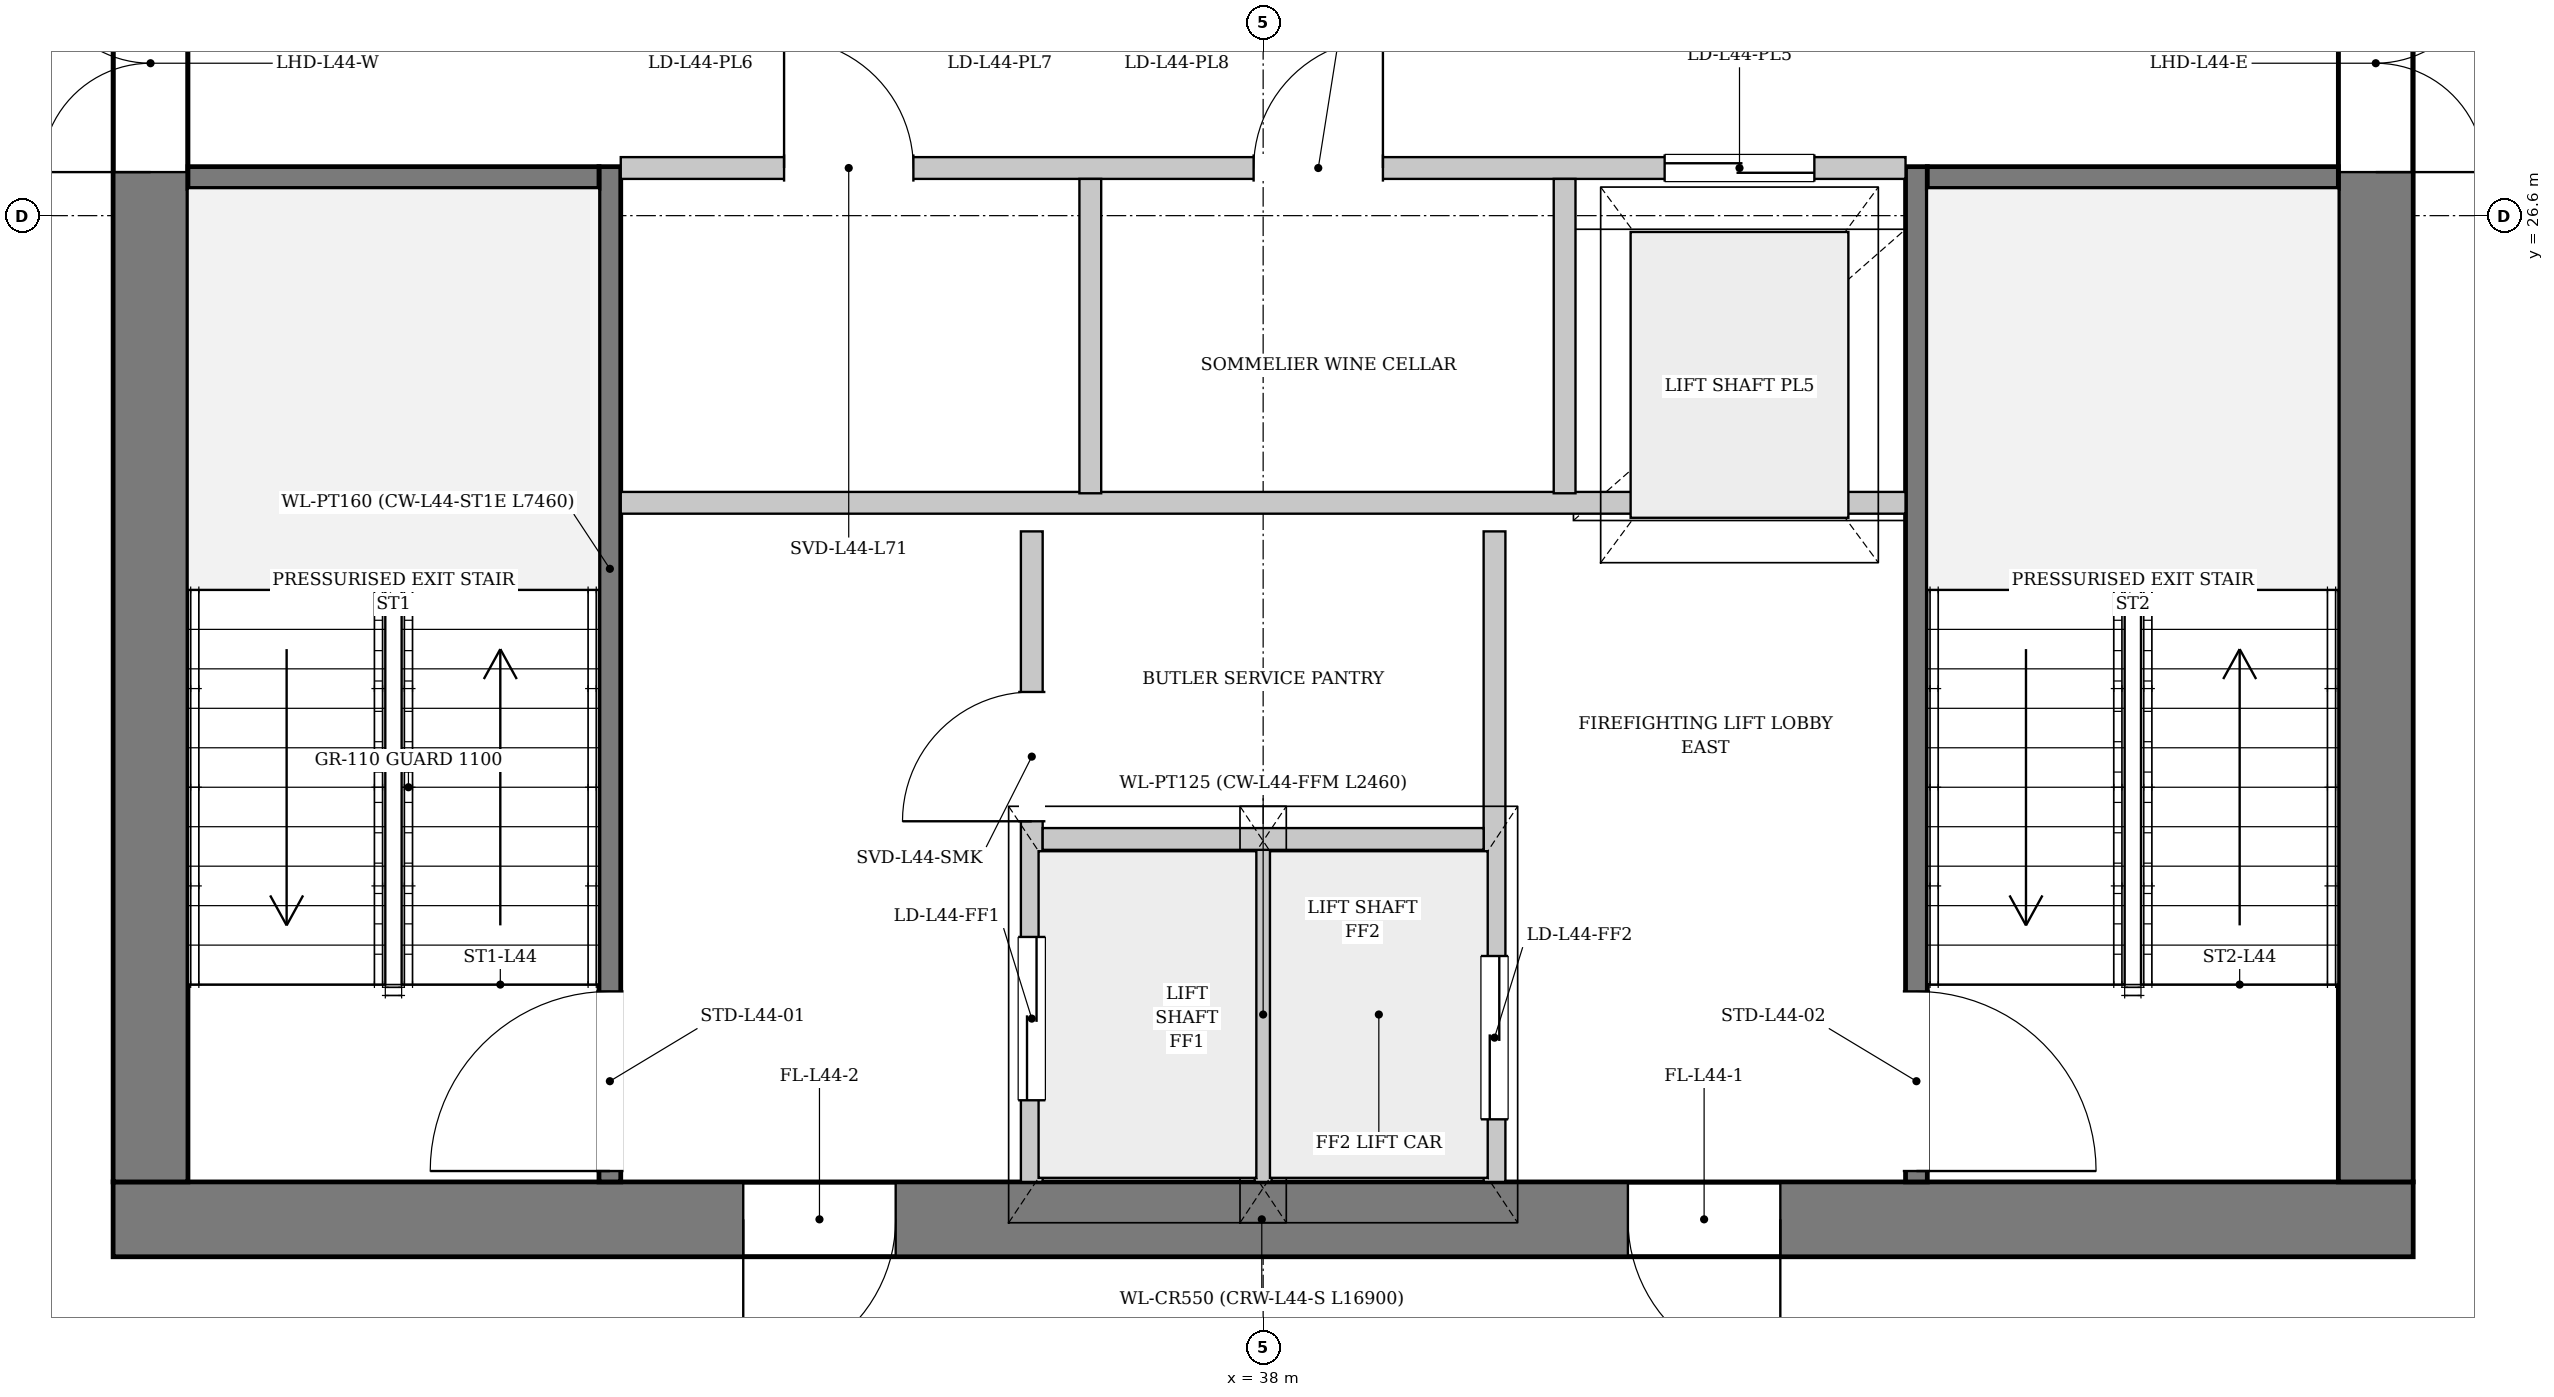
"""IFC4 building model, lengths in metres.
Left out: names, types, materials, properties, quantities, classifications, styles, units other than length and angle.
Written with IfcOpenShell. Run it as: python <this file> out.ifc"""

import sys

from ifc_helpers import new_model, si_unit, direction, frame, frame_2d, origin, place, context, subcontext, project, spatial, rectangle, extrude, source, transform, mapped, element, fill, save


model = new_model("IFC4")
c1 = context("Model", 3, precision=1e-05, world=origin(), true_north=direction((0.0, 1.0)))
c2 = subcontext(c1, "Body", "Model", "MODEL_VIEW")
j1 = project(units=[si_unit("LENGTHUNIT", "METRE"), si_unit("PLANEANGLEUNIT", "RADIAN")], contexts=[c1])
p1 = place(None, origin())
s1 = spatial("IfcSite", under=j1, at=p1, CompositionType="ELEMENT")
p2 = place(p1, origin())
s2 = spatial("IfcBuilding", under=s1, at=p2, CompositionType="ELEMENT")
p3 = place(p2, frame((0.0, 0.0, 167.9)))
s3 = spatial("IfcBuildingStorey", under=s2, at=p3, CompositionType="ELEMENT", Elevation=167.9)
p4 = place(p3, frame((52.97, 20.198, 0.0), z_axis=(0.0, 0.0, 1.0), x_axis=(-0.656914851648, -0.753964772177, 0.0)))
e1 = element("IfcWall", 1, at=p4, inside=s3, PredefinedType="SOLIDWALL", context=c2, shape_type="SweptSolid", body=[
    extrude(rectangle(XDim=23.44, YDim=0.32, at=frame_2d((11.72, 0.0))), origin(), (0.0, 0.0, 1.0), 2.722),
])
p5 = place(p4, frame((6.751, 0.0, 0.0)))
e2 = element("IfcOpeningElement", 2, at=p5, cuts=e1, PredefinedType="OPENING", context=c2, shape_type="SweptSolid", body=[
    extrude(rectangle(XDim=1.5, YDim=2.3, at=frame_2d((0.75, 1.15))), frame((0.0, 0.17, 0.0), z_axis=(0.0, -1.0, 0.0), x_axis=(1.0, 0.0, 0.0)), (0.0, 0.0, 1.0), 0.34),
])
p6 = place(p4, frame((17.646, 0.0, 0.252)))
e3 = element("IfcOpeningElement", 3, at=p6, cuts=e1, PredefinedType="OPENING", context=c2, shape_type="SweptSolid", body=[
    extrude(rectangle(XDim=2.6, YDim=2.35, at=frame_2d((1.3, 1.175))), frame((0.0, 0.17, 0.0), z_axis=(0.0, -1.0, 0.0), x_axis=(1.0, 0.0, 0.0)), (0.0, 0.0, 1.0), 0.34),
])
p7 = place(p3, frame((46.45, 19.225, 0.0), z_axis=(0.0, 0.0, 1.0), x_axis=(-1.0, 0.0, 0.0)))
e4 = element("IfcWall", 4, at=p7, inside=s3, PredefinedType="SHEAR", context=c2, shape_type="SweptSolid", body=[
    extrude(rectangle(XDim=16.9, YDim=0.55, at=frame_2d((8.45, 0.0))), origin(), (0.0, 0.0, 1.0), 3.33),
])
p8 = place(p7, frame((4.65, 0.0, 0.0)))
e5 = element("IfcOpeningElement", 5, at=p8, cuts=e4, PredefinedType="OPENING", context=c2, shape_type="SweptSolid", body=[
    extrude(rectangle(XDim=1.12, YDim=2.25, at=frame_2d((0.56, 1.125))), frame((0.0, 0.285, 0.0), z_axis=(0.0, -1.0, 0.0), x_axis=(1.0, 0.0, 0.0)), (0.0, 0.0, 1.0), 0.57),
])
p9 = place(p7, frame((11.15, 0.0, 0.0)))
e6 = element("IfcOpeningElement", 6, at=p9, cuts=e4, PredefinedType="OPENING", context=c2, shape_type="SweptSolid", body=[
    extrude(rectangle(XDim=1.12, YDim=2.25, at=frame_2d((0.56, 1.125))), frame((0.0, 0.285, 0.0), z_axis=(0.0, -1.0, 0.0), x_axis=(1.0, 0.0, 0.0)), (0.0, 0.0, 1.0), 0.57),
])
p10 = place(p3, frame((29.825, 19.5, 0.0), z_axis=(0.0, 0.0, 1.0), x_axis=(0.0, 1.0, 0.0)))
e7 = element("IfcWall", 7, at=p10, inside=s3, PredefinedType="SHEAR", context=c2, shape_type="SweptSolid", body=[
    extrude(rectangle(XDim=14.2, YDim=0.55, at=frame_2d((7.1, 0.0))), origin(), (0.0, 0.0, 1.0), 3.33),
])
p11 = place(p10, frame((7.42, 0.0, 0.0)))
e8 = element("IfcOpeningElement", 8, at=p11, cuts=e7, PredefinedType="OPENING", context=c2, shape_type="SweptSolid", body=[
    extrude(rectangle(XDim=1.6, YDim=2.2, at=frame_2d((0.8, 1.1))), frame((0.0, 0.285, 0.0), z_axis=(0.0, -1.0, 0.0), x_axis=(1.0, 0.0, 0.0)), (0.0, 0.0, 1.0), 0.57),
])
p12 = place(p3, frame((46.175, 33.7, 0.0), z_axis=(0.0, 0.0, 1.0), x_axis=(0.0, -1.0, 0.0)))
e9 = element("IfcWall", 9, at=p12, inside=s3, PredefinedType="SHEAR", context=c2, shape_type="SweptSolid", body=[
    extrude(rectangle(XDim=14.2, YDim=0.55, at=frame_2d((7.1, 0.0))), origin(), (0.0, 0.0, 1.0), 3.33),
])
p13 = place(p12, frame((5.18, 0.0, 0.0)))
e10 = element("IfcOpeningElement", 10, at=p13, cuts=e9, PredefinedType="OPENING", context=c2, shape_type="SweptSolid", body=[
    extrude(rectangle(XDim=1.6, YDim=2.2, at=frame_2d((0.8, 1.1))), frame((0.0, 0.285, 0.0), z_axis=(0.0, -1.0, 0.0), x_axis=(1.0, 0.0, 0.0)), (0.0, 0.0, 1.0), 0.57),
])
p14 = place(p12, frame((2.05, 0.0, 0.0)))
e11 = element("IfcOpeningElement", 11, at=p14, cuts=e9, PredefinedType="OPENING", context=c2, shape_type="SweptSolid", body=[
    extrude(rectangle(XDim=0.95, YDim=2.1, at=frame_2d((0.475, 1.05))), frame((0.0, 0.285, 0.0), z_axis=(0.0, -1.0, 0.0), x_axis=(1.0, 0.0, 0.0)), (0.0, 0.0, 1.0), 0.57),
])
p15 = place(p3, frame((33.2, 19.5, 0.0), z_axis=(0.0, 0.0, 1.0), x_axis=(0.0, 1.0, 0.0)))
e12 = element("IfcWall", 12, at=p15, inside=s3, PredefinedType="PARTITIONING", context=c2, shape_type="SweptSolid", body=[
    extrude(rectangle(XDim=7.46, YDim=0.16, at=frame_2d((3.73, 0.0))), origin(), (0.0, 0.0, 1.0), 3.33),
])
p16 = place(p15, frame((0.08, 0.0, 0.0)))
e13 = element("IfcOpeningElement", 13, at=p16, cuts=e12, PredefinedType="OPENING", context=c2, shape_type="SweptSolid", body=[
    extrude(rectangle(XDim=1.32, YDim=2.2, at=frame_2d((0.66, 1.1))), frame((0.0, 0.09, 0.0), z_axis=(0.0, -1.0, 0.0), x_axis=(1.0, 0.0, 0.0)), (0.0, 0.0, 1.0), 0.18),
])
p17 = place(p3, frame((30.1, 26.88, 0.0), z_axis=(0.0, 0.0, 1.0), x_axis=(1.0, 0.0, 0.0)))
e14 = element("IfcWall", 14, at=p17, inside=s3, PredefinedType="PARTITIONING", context=c2, shape_type="SweptSolid", body=[
    extrude(rectangle(XDim=3.02, YDim=0.16, at=frame_2d((1.51, 0.0))), origin(), (0.0, 0.0, 1.0), 3.33),
])
p18 = place(p3, frame((42.8, 26.96, 0.0), z_axis=(0.0, 0.0, 1.0), x_axis=(0.0, -1.0, 0.0)))
e15 = element("IfcWall", 15, at=p18, inside=s3, PredefinedType="PARTITIONING", context=c2, shape_type="SweptSolid", body=[
    extrude(rectangle(XDim=7.46, YDim=0.16, at=frame_2d((3.73, 0.0))), origin(), (0.0, 0.0, 1.0), 3.33),
])
p19 = place(p18, frame((6.06, 0.0, 0.0)))
e16 = element("IfcOpeningElement", 16, at=p19, cuts=e15, PredefinedType="OPENING", context=c2, shape_type="SweptSolid", body=[
    extrude(rectangle(XDim=1.32, YDim=2.2, at=frame_2d((0.66, 1.1))), frame((0.0, 0.09, 0.0), z_axis=(0.0, -1.0, 0.0), x_axis=(1.0, 0.0, 0.0)), (0.0, 0.0, 1.0), 0.18),
])
p20 = place(p3, frame((42.88, 26.88, 0.0), z_axis=(0.0, 0.0, 1.0), x_axis=(1.0, 0.0, 0.0)))
e17 = element("IfcWall", 17, at=p20, inside=s3, PredefinedType="PARTITIONING", context=c2, shape_type="SweptSolid", body=[
    extrude(rectangle(XDim=3.02, YDim=0.16, at=frame_2d((1.51, 0.0))), origin(), (0.0, 0.0, 1.0), 3.33),
])
p21 = place(p3, frame((36.3, 19.5, 0.0), z_axis=(0.0, 0.0, 1.0), x_axis=(0.0, 1.0, 0.0)))
e18 = element("IfcWall", 18, at=p21, inside=s3, PredefinedType="PARTITIONING", context=c2, shape_type="SweptSolid", body=[
    extrude(rectangle(XDim=4.78, YDim=0.16, at=frame_2d((2.39, 0.0))), origin(), (0.0, 0.0, 1.0), 3.33),
])
p22 = place(p21, frame((0.6, 0.0, 0.0)))
e19 = element("IfcOpeningElement", 19, at=p22, cuts=e18, PredefinedType="OPENING", context=c2, shape_type="SweptSolid", body=[
    extrude(rectangle(XDim=1.2, YDim=2.2, at=frame_2d((0.6, 1.1))), frame((0.0, 0.09, 0.0), z_axis=(0.0, -1.0, 0.0), x_axis=(1.0, 0.0, 0.0)), (0.0, 0.0, 1.0), 0.18),
])
p23 = place(p21, frame((2.65, 0.0, 0.0)))
e20 = element("IfcOpeningElement", 20, at=p23, cuts=e18, PredefinedType="OPENING", context=c2, shape_type="SweptSolid", body=[
    extrude(rectangle(XDim=0.95, YDim=2.1, at=frame_2d((0.475, 1.05))), frame((0.0, 0.09, 0.0), z_axis=(0.0, -1.0, 0.0), x_axis=(1.0, 0.0, 0.0)), (0.0, 0.0, 1.0), 0.18),
])
p24 = place(p3, frame((39.7, 24.28, 0.0), z_axis=(0.0, 0.0, 1.0), x_axis=(0.0, -1.0, 0.0)))
e21 = element("IfcWall", 21, at=p24, inside=s3, PredefinedType="PARTITIONING", context=c2, shape_type="SweptSolid", body=[
    extrude(rectangle(XDim=4.78, YDim=0.16, at=frame_2d((2.39, 0.0))), origin(), (0.0, 0.0, 1.0), 3.33),
])
p25 = place(p24, frame((3.12, 0.0, 0.0)))
e22 = element("IfcOpeningElement", 22, at=p25, cuts=e21, PredefinedType="OPENING", context=c2, shape_type="SweptSolid", body=[
    extrude(rectangle(XDim=1.2, YDim=2.2, at=frame_2d((0.6, 1.1))), frame((0.0, 0.09, 0.0), z_axis=(0.0, -1.0, 0.0), x_axis=(1.0, 0.0, 0.0)), (0.0, 0.0, 1.0), 0.18),
])
p26 = place(p3, frame((38.0, 19.5, 0.0), z_axis=(0.0, 0.0, 1.0), x_axis=(0.0, 1.0, 0.0)))
e23 = element("IfcWall", 23, at=p26, inside=s3, PredefinedType="PARTITIONING", context=c2, shape_type="SweptSolid", body=[
    extrude(rectangle(XDim=2.46, YDim=0.125, at=frame_2d((1.23, 0.0))), origin(), (0.0, 0.0, 1.0), 3.33),
])
p27 = place(p3, frame((36.38, 22.02, 0.0), z_axis=(0.0, 0.0, 1.0), x_axis=(1.0, 0.0, 0.0)))
e24 = element("IfcWall", 24, at=p27, inside=s3, PredefinedType="PARTITIONING", context=c2, shape_type="SweptSolid", body=[
    extrude(rectangle(XDim=3.24, YDim=0.16, at=frame_2d((1.62, 0.0))), origin(), (0.0, 0.0, 1.0), 3.33),
])
p28 = place(p3, frame((33.28, 24.49, 0.0), z_axis=(0.0, 0.0, 1.0), x_axis=(1.0, 0.0, 0.0)))
e25 = element("IfcWall", 25, at=p28, inside=s3, PredefinedType="PARTITIONING", context=c2, shape_type="SweptSolid", body=[
    extrude(rectangle(XDim=9.44, YDim=0.16, at=frame_2d((4.72, 0.0))), origin(), (0.0, 0.0, 1.0), 3.33),
])
p29 = place(p3, frame((33.28, 26.95, 0.0), z_axis=(0.0, 0.0, 1.0), x_axis=(1.0, 0.0, 0.0)))
e26 = element("IfcWall", 26, at=p29, inside=s3, PredefinedType="PARTITIONING", context=c2, shape_type="SweptSolid", body=[
    extrude(rectangle(XDim=9.44, YDim=0.16, at=frame_2d((4.72, 0.0))), origin(), (0.0, 0.0, 1.0), 3.33),
])
p30 = place(p29, frame((1.2, 0.0, 0.0)))
e27 = element("IfcOpeningElement", 27, at=p30, cuts=e26, PredefinedType="OPENING", context=c2, shape_type="SweptSolid", body=[
    extrude(rectangle(XDim=0.95, YDim=2.1, at=frame_2d((0.475, 1.05))), frame((0.0, 0.09, 0.0), z_axis=(0.0, -1.0, 0.0), x_axis=(1.0, 0.0, 0.0)), (0.0, 0.0, 1.0), 0.18),
])
p31 = place(p29, frame((4.65, 0.0, 0.0)))
e28 = element("IfcOpeningElement", 28, at=p31, cuts=e26, PredefinedType="OPENING", context=c2, shape_type="SweptSolid", body=[
    extrude(rectangle(XDim=0.95, YDim=2.1, at=frame_2d((0.475, 1.05))), frame((0.0, 0.09, 0.0), z_axis=(0.0, -1.0, 0.0), x_axis=(1.0, 0.0, 0.0)), (0.0, 0.0, 1.0), 0.18),
])
p32 = place(p29, frame((7.67, 0.0, 0.0)))
e29 = element("IfcOpeningElement", 29, at=p32, cuts=e26, PredefinedType="OPENING", context=c2, shape_type="SweptSolid", body=[
    extrude(rectangle(XDim=1.1, YDim=2.2, at=frame_2d((0.55, 1.1))), frame((0.0, 0.09, 0.0), z_axis=(0.0, -1.0, 0.0), x_axis=(1.0, 0.0, 0.0)), (0.0, 0.0, 1.0), 0.18),
])
for number, where, z_axis, x_axis in (
    (30, (36.73, 24.56, 0.0), (0.0, 0.0, 1.0), (0.0, 1.0, 0.0)),
    (31, (40.215, 24.56, 0.0), (0.0, 0.0, 1.0), (0.0, 1.0, 0.0)),
):
    element("IfcWall", number, at=place(p3, frame(where, z_axis=z_axis, x_axis=x_axis)), inside=s3, PredefinedType="PARTITIONING", context=c2, shape_type="SweptSolid", body=[
        extrude(rectangle(XDim=2.31, YDim=0.16, at=frame_2d((1.155, 0.0))), origin(), (0.0, 0.0, 1.0), 3.33),
    ])
m1 = source(origin(), c2, "Body", "SweptSolid", [
    extrude(rectangle(XDim=1.12, YDim=2.25, at=frame_2d((0.56, 1.125))), frame((0.0, 0.025, 0.0), z_axis=(0.0, -1.0, 0.0), x_axis=(1.0, 0.0, 0.0)), (0.0, 0.0, 1.0), 0.05),
])
p33 = place(p8, origin())
e32 = element("IfcDoor", 32, at=p33, inside=s3, OperationType="SINGLE_SWING_LEFT", PredefinedType="DOOR", context=c2, shape_type="MappedRepresentation", body=[
    mapped(m1, transform((0.0, 0.0, 0.0), x_axis=(1.0, 0.0, 0.0), y_axis=(0.0, 1.0, 0.0), z_axis=(0.0, 0.0, 1.0), scale=1.0)),
])
fill(e5, e32)
p34 = place(p9, origin())
e33 = element("IfcDoor", 33, at=p34, inside=s3, OperationType="SINGLE_SWING_RIGHT", PredefinedType="DOOR", context=c2, shape_type="MappedRepresentation", body=[
    mapped(m1, transform((0.0, 0.0, 0.0), x_axis=(1.0, 0.0, 0.0), y_axis=(0.0, 1.0, 0.0), z_axis=(0.0, 0.0, 1.0), scale=1.0)),
])
fill(e6, e33)
m2 = source(origin(), c2, "Body", "SweptSolid", [
    extrude(rectangle(XDim=1.6, YDim=2.2, at=frame_2d((0.8, 1.1))), frame((0.0, 0.025, 0.0), z_axis=(0.0, -1.0, 0.0), x_axis=(1.0, 0.0, 0.0)), (0.0, 0.0, 1.0), 0.05),
])
p35 = place(p11, origin())
e34 = element("IfcDoor", 34, at=p35, inside=s3, OperationType="DOUBLE_DOOR_SINGLE_SWING", PredefinedType="DOOR", context=c2, shape_type="MappedRepresentation", body=[
    mapped(m2, transform((0.0, 0.0, 0.0), x_axis=(1.0, 0.0, 0.0), y_axis=(0.0, 1.0, 0.0), z_axis=(0.0, 0.0, 1.0), scale=1.0)),
])
fill(e8, e34)
p36 = place(p13, origin())
e35 = element("IfcDoor", 35, at=p36, inside=s3, OperationType="DOUBLE_DOOR_SINGLE_SWING", PredefinedType="DOOR", context=c2, shape_type="MappedRepresentation", body=[
    mapped(m2, transform((0.0, 0.0, 0.0), x_axis=(1.0, 0.0, 0.0), y_axis=(0.0, 1.0, 0.0), z_axis=(0.0, 0.0, 1.0), scale=1.0)),
])
fill(e10, e35)
m3 = source(origin(), c2, "Body", "SweptSolid", [
    extrude(rectangle(XDim=1.32, YDim=2.2, at=frame_2d((0.66, 1.1))), frame((0.0, 0.025, 0.0), z_axis=(0.0, -1.0, 0.0), x_axis=(1.0, 0.0, 0.0)), (0.0, 0.0, 1.0), 0.05),
])
p37 = place(p16, origin())
e36 = element("IfcDoor", 36, at=p37, inside=s3, OperationType="SINGLE_SWING_LEFT", PredefinedType="DOOR", context=c2, shape_type="MappedRepresentation", body=[
    mapped(m3, transform((0.0, 0.0, 0.0), x_axis=(1.0, 0.0, 0.0), y_axis=(0.0, 1.0, 0.0), z_axis=(0.0, 0.0, 1.0), scale=1.0)),
])
fill(e13, e36)
p38 = place(p19, origin())
e37 = element("IfcDoor", 37, at=p38, inside=s3, OperationType="SINGLE_SWING_RIGHT", PredefinedType="DOOR", context=c2, shape_type="MappedRepresentation", body=[
    mapped(m3, transform((0.0, 0.0, 0.0), x_axis=(1.0, 0.0, 0.0), y_axis=(0.0, 1.0, 0.0), z_axis=(0.0, 0.0, 1.0), scale=1.0)),
])
fill(e16, e37)
m4 = source(origin(), c2, "Body", "SweptSolid", [
    extrude(rectangle(XDim=1.2, YDim=2.2, at=frame_2d((0.6, 1.1))), frame((0.0, 0.025, 0.0), z_axis=(0.0, -1.0, 0.0), x_axis=(1.0, 0.0, 0.0)), (0.0, 0.0, 1.0), 0.05),
])
p39 = place(p22, origin())
e38 = element("IfcDoor", 38, at=p39, inside=s3, OperationType="DOUBLE_DOOR_SLIDING", PredefinedType="DOOR", context=c2, shape_type="MappedRepresentation", body=[
    mapped(m4, transform((0.0, 0.0, 0.0), x_axis=(1.0, 0.0, 0.0), y_axis=(0.0, 1.0, 0.0), z_axis=(0.0, 0.0, 1.0), scale=1.0)),
])
fill(e19, e38)
m5 = source(origin(), c2, "Body", "SweptSolid", [
    extrude(rectangle(XDim=0.95, YDim=2.1, at=frame_2d((0.475, 1.05))), frame((0.0, 0.025, 0.0), z_axis=(0.0, -1.0, 0.0), x_axis=(1.0, 0.0, 0.0)), (0.0, 0.0, 1.0), 0.05),
])
p40 = place(p23, origin())
e39 = element("IfcDoor", 39, at=p40, inside=s3, OperationType="SINGLE_SWING_LEFT", PredefinedType="DOOR", context=c2, shape_type="MappedRepresentation", body=[
    mapped(m5, transform((0.0, 0.0, 0.0), x_axis=(1.0, 0.0, 0.0), y_axis=(0.0, 1.0, 0.0), z_axis=(0.0, 0.0, 1.0), scale=1.0)),
])
fill(e20, e39)
p41 = place(p25, origin())
e40 = element("IfcDoor", 40, at=p41, inside=s3, OperationType="DOUBLE_DOOR_SLIDING", PredefinedType="DOOR", context=c2, shape_type="MappedRepresentation", body=[
    mapped(m4, transform((0.0, 0.0, 0.0), x_axis=(1.0, 0.0, 0.0), y_axis=(0.0, 1.0, 0.0), z_axis=(0.0, 0.0, 1.0), scale=1.0)),
])
fill(e22, e40)
p42 = place(p30, origin())
e41 = element("IfcDoor", 41, at=p42, inside=s3, OperationType="SINGLE_SWING_LEFT", PredefinedType="DOOR", context=c2, shape_type="MappedRepresentation", body=[
    mapped(m5, transform((0.0, 0.0, 0.0), x_axis=(1.0, 0.0, 0.0), y_axis=(0.0, 1.0, 0.0), z_axis=(0.0, 0.0, 1.0), scale=1.0)),
])
fill(e27, e41)
p43 = place(p31, origin())
e42 = element("IfcDoor", 42, at=p43, inside=s3, OperationType="SINGLE_SWING_RIGHT", PredefinedType="DOOR", context=c2, shape_type="MappedRepresentation", body=[
    mapped(m5, transform((0.0, 0.0, 0.0), x_axis=(1.0, 0.0, 0.0), y_axis=(0.0, 1.0, 0.0), z_axis=(0.0, 0.0, 1.0), scale=1.0)),
])
fill(e28, e42)
m6 = source(origin(), c2, "Body", "SweptSolid", [
    extrude(rectangle(XDim=1.1, YDim=2.2, at=frame_2d((0.55, 1.1))), frame((0.0, 0.025, 0.0), z_axis=(0.0, -1.0, 0.0), x_axis=(1.0, 0.0, 0.0)), (0.0, 0.0, 1.0), 0.05),
])
p44 = place(p32, origin())
e43 = element("IfcDoor", 43, at=p44, inside=s3, OperationType="DOUBLE_DOOR_SLIDING", PredefinedType="DOOR", context=c2, shape_type="MappedRepresentation", body=[
    mapped(m6, transform((0.0, 0.0, 0.0), x_axis=(1.0, 0.0, 0.0), y_axis=(0.0, 1.0, 0.0), z_axis=(0.0, 0.0, 1.0), scale=1.0)),
])
fill(e29, e43)
save(model, sys.argv[1])
